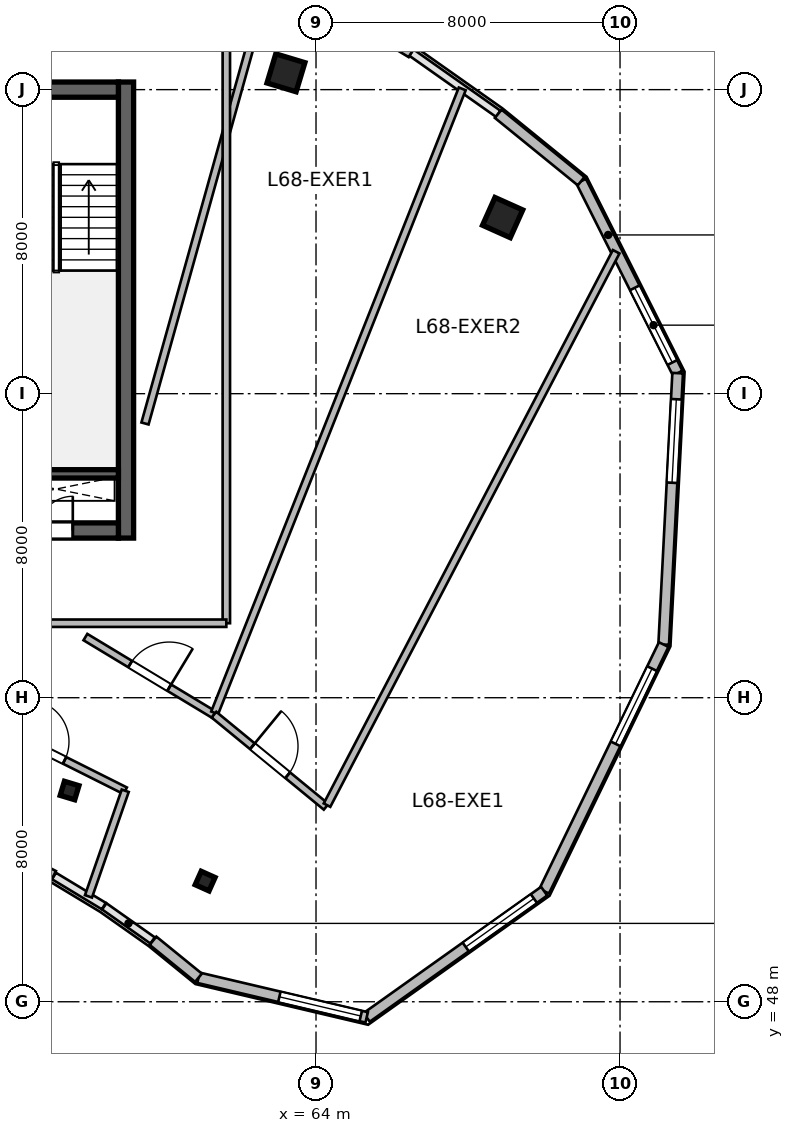
"""IFC4 building model, lengths in metres.
Left out: names, types, materials, properties, quantities, classifications, styles, units other than length and angle.
Written with IfcOpenShell. Run it as: python <this file> out.ifc"""

import sys

from ifc_helpers import new_model, si_unit, direction, frame, frame_2d, origin, origin_2d, place, context, subcontext, project, spatial, rectangle, i_section, extrude, source, transform, mapped, element, fill, save


model = new_model("IFC4")
c1 = context("Model", 3, precision=1e-05, world=origin(), true_north=direction((0.0, 1.0)))
c2 = subcontext(c1, "Body", "Model", "MODEL_VIEW")
j1 = project(units=[si_unit("LENGTHUNIT", "METRE"), si_unit("PLANEANGLEUNIT", "RADIAN")], contexts=[c1])
p1 = place(None, origin())
s1 = spatial("IfcSite", under=j1, at=p1, CompositionType="ELEMENT")
p2 = place(p1, origin())
s2 = spatial("IfcBuilding", under=s1, at=p2, CompositionType="ELEMENT")
p3 = place(p2, frame((0.0, 0.0, 279.6)))
s3 = spatial("IfcBuildingStorey", under=s2, at=p3, CompositionType="ELEMENT", Elevation=279.6)
m1 = source(origin(), c2, "Body", "SweptSolid", [
    extrude(rectangle(XDim=12.0, YDim=0.4, at=frame_2d((6.0, 0.0))), origin(), (0.0, 0.0, 1.0), 3.9),
])
p4 = place(p3, frame((59.0, 60.2, 0.0), z_axis=(0.0, 0.0, 1.0), x_axis=(0.0, 1.0, 0.0)))
e1 = element("IfcWall", 1, at=p4, inside=s3, PredefinedType="SHEAR", context=c2, shape_type="MappedRepresentation", body=[
    mapped(m1, transform((0.0, 0.0, 0.0), scale=1.0)),
])
m2 = source(origin(), c2, "Body", "SweptSolid", [
    extrude(rectangle(XDim=21.6, YDim=0.4, at=frame_2d((10.8, 0.0))), origin(), (0.0, 0.0, 1.0), 3.9),
])
p5 = place(p3, frame((37.2, 60.4, 0.0), z_axis=(0.0, 0.0, 1.0), x_axis=(1.0, 0.0, 0.0)))
e2 = element("IfcWall", 2, at=p5, inside=s3, PredefinedType="SHEAR", context=c2, shape_type="MappedRepresentation", body=[
    mapped(m2, transform((0.0, 0.0, 0.0), scale=1.0)),
])
p6 = place(p5, frame((1.1, 0.0, 0.0)))
e3 = element("IfcOpeningElement", 3, at=p6, cuts=e2, PredefinedType="OPENING", context=c2, shape_type="SweptSolid", body=[
    extrude(rectangle(XDim=1.15, YDim=2.15, at=frame_2d((0.575, 1.075))), frame((0.0, 0.21, 0.0), z_axis=(0.0, -1.0, 0.0), x_axis=(1.0, 0.0, 0.0)), (0.0, 0.0, 1.0), 0.42),
])
p7 = place(p5, frame((19.5, 0.0, 0.0)))
e4 = element("IfcOpeningElement", 4, at=p7, cuts=e2, PredefinedType="OPENING", context=c2, shape_type="SweptSolid", body=[
    extrude(rectangle(XDim=0.9, YDim=2.1, at=frame_2d((0.45, 1.05))), frame((0.0, 0.21, 0.0), z_axis=(0.0, -1.0, 0.0), x_axis=(1.0, 0.0, 0.0)), (0.0, 0.0, 1.0), 0.42),
])
p8 = place(p5, frame((12.02, 0.0, 0.0)))
e5 = element("IfcOpeningElement", 5, at=p8, cuts=e2, PredefinedType="OPENING", context=c2, shape_type="SweptSolid", body=[
    extrude(rectangle(XDim=1.6, YDim=2.15, at=frame_2d((0.8, 1.075))), frame((0.0, 0.21, 0.0), z_axis=(0.0, -1.0, 0.0), x_axis=(1.0, 0.0, 0.0)), (0.0, 0.0, 1.0), 0.42),
])
p9 = place(p3, frame((37.2, 72.0, 0.0), z_axis=(0.0, 0.0, 1.0), x_axis=(1.0, 0.0, 0.0)))
e6 = element("IfcWall", 6, at=p9, inside=s3, PredefinedType="SHEAR", context=c2, shape_type="MappedRepresentation", body=[
    mapped(m2, transform((0.0, 0.0, 0.0), scale=1.0)),
])
p10 = place(p9, frame((1.2, 0.0, 0.0)))
e7 = element("IfcOpeningElement", 7, at=p10, cuts=e6, PredefinedType="OPENING", context=c2, shape_type="SweptSolid", body=[
    extrude(rectangle(XDim=0.9, YDim=2.1, at=frame_2d((0.45, 1.05))), frame((0.0, 0.21, 0.0), z_axis=(0.0, -1.0, 0.0), x_axis=(1.0, 0.0, 0.0)), (0.0, 0.0, 1.0), 0.42),
])
p11 = place(p9, frame((14.7, 0.0, 0.0)))
e8 = element("IfcOpeningElement", 8, at=p11, cuts=e6, PredefinedType="OPENING", context=c2, shape_type="SweptSolid", body=[
    extrude(rectangle(XDim=1.2, YDim=2.15, at=frame_2d((0.6, 1.075))), frame((0.0, 0.21, 0.0), z_axis=(0.0, -1.0, 0.0), x_axis=(1.0, 0.0, 0.0)), (0.0, 0.0, 1.0), 0.42),
])
p12 = place(p9, frame((4.15, 0.0, 0.0)))
e9 = element("IfcOpeningElement", 9, at=p12, cuts=e6, PredefinedType="OPENING", context=c2, shape_type="SweptSolid", body=[
    extrude(rectangle(XDim=1.3, YDim=2.15, at=frame_2d((0.65, 1.075))), frame((0.0, 0.21, 0.0), z_axis=(0.0, -1.0, 0.0), x_axis=(1.0, 0.0, 0.0)), (0.0, 0.0, 1.0), 0.42),
])
p13 = place(p9, frame((7.25, 0.0, 0.0)))
e10 = element("IfcOpeningElement", 10, at=p13, cuts=e6, PredefinedType="OPENING", context=c2, shape_type="SweptSolid", body=[
    extrude(rectangle(XDim=0.9, YDim=2.1, at=frame_2d((0.45, 1.05))), frame((0.0, 0.21, 0.0), z_axis=(0.0, -1.0, 0.0), x_axis=(1.0, 0.0, 0.0)), (0.0, 0.0, 1.0), 0.42),
])
m3 = source(origin(), c2, "Body", "SweptSolid", [
    extrude(rectangle(XDim=3.27, YDim=0.22, at=frame_2d((1.635, 0.0))), origin(), (0.0, 0.0, 1.0), 3.9),
])
p14 = place(p3, frame((55.53, 61.89, 0.0), z_axis=(0.0, 0.0, 1.0), x_axis=(1.0, 0.0, 0.0)))
e11 = element("IfcWall", 11, at=p14, inside=s3, PredefinedType="SHEAR", context=c2, shape_type="MappedRepresentation", body=[
    mapped(m3, transform((0.0, 0.0, 0.0), scale=1.0)),
])
m4 = source(origin(), c2, "Body", "SweptSolid", [
    extrude(i_section(OverallWidth=0.399, OverallDepth=0.387, WebThickness=0.021, FlangeThickness=0.033, at=origin_2d()), origin(), (0.0, 0.0, 1.0), 3.9),
])
p15 = place(p3, frame((57.515, 53.558, 0.0), z_axis=(0.0, 0.0, 1.0), x_axis=(0.288697611798, 0.957420330337, 0.0)))
e12 = element("IfcColumn", 12, at=p15, inside=s3, PredefinedType="COLUMN", context=c2, shape_type="MappedRepresentation", body=[
    mapped(m4, transform((0.0, 0.0, 0.0), scale=1.0)),
])
m5 = source(origin(), c2, "Body", "SweptSolid", [
    extrude(rectangle(XDim=0.8, YDim=0.8, at=origin_2d()), origin(), (0.0, 0.0, 1.0), 3.9),
])
p16 = place(p3, frame((63.209, 72.442, 0.0), z_axis=(0.0, 0.0, 1.0), x_axis=(0.288697611798, 0.957420330337, 0.0)))
e13 = element("IfcColumn", 13, at=p16, inside=s3, PredefinedType="COLUMN", context=c2, shape_type="MappedRepresentation", body=[
    mapped(m5, transform((0.0, 0.0, 0.0), scale=1.0)),
])
p17 = place(p3, frame((61.082, 51.175, 0.0), z_axis=(0.0, 0.0, 1.0), x_axis=(0.409126902895, 0.912477494148, 0.0)))
e14 = element("IfcColumn", 14, at=p17, inside=s3, PredefinedType="COLUMN", context=c2, shape_type="MappedRepresentation", body=[
    mapped(m4, transform((0.0, 0.0, 0.0), scale=1.0)),
])
p18 = place(p3, frame((68.91, 68.633, 0.0), z_axis=(0.0, 0.0, 1.0), x_axis=(0.409126902895, 0.912477494148, 0.0)))
e15 = element("IfcColumn", 15, at=p18, inside=s3, PredefinedType="COLUMN", context=c2, shape_type="MappedRepresentation", body=[
    mapped(m5, transform((0.0, 0.0, 0.0), scale=1.0)),
])
m6 = source(origin(), c2, "Body", "SweptSolid", [
    extrude(rectangle(XDim=5.653, YDim=0.28, at=frame_2d((2.827, 0.0))), origin(), (0.0, 0.0, 1.0), 3.64),
])
p19 = place(p3, frame((70.976, 69.591, 0.0), z_axis=(0.0, 0.0, 1.0), x_axis=(0.449302555419, -0.893379658205, 0.0)))
e16 = element("IfcWall", 16, at=p19, inside=s3, PredefinedType="SOLIDWALL", context=c2, shape_type="MappedRepresentation", body=[
    mapped(m6, transform((0.0, 0.0, 0.0), scale=1.0)),
])
p20 = place(p19, frame((3.14, 0.0, 0.95)))
e17 = element("IfcOpeningElement", 17, at=p20, cuts=e16, PredefinedType="OPENING", context=c2, shape_type="SweptSolid", body=[
    extrude(rectangle(XDim=2.2, YDim=2.1, at=frame_2d((1.1, 1.05))), frame((0.0, 0.15, 0.0), z_axis=(0.0, -1.0, 0.0), x_axis=(1.0, 0.0, 0.0)), (0.0, 0.0, 1.0), 0.3),
])
m7 = source(origin(), c2, "Body", "SweptSolid", [
    extrude(rectangle(XDim=7.151, YDim=0.28, at=frame_2d((3.576, 0.0))), origin(), (0.0, 0.0, 1.0), 3.64),
])
p21 = place(p3, frame((73.516, 64.54, 0.0), z_axis=(0.0, 0.0, 1.0), x_axis=(-0.051449614265, -0.998675591567, 0.0)))
e18 = element("IfcWall", 18, at=p21, inside=s3, PredefinedType="SOLIDWALL", context=c2, shape_type="MappedRepresentation", body=[
    mapped(m7, transform((0.0, 0.0, 0.0), scale=1.0)),
])
p22 = place(p21, frame((0.688, 0.0, 0.95)))
e19 = element("IfcOpeningElement", 19, at=p22, cuts=e18, PredefinedType="OPENING", context=c2, shape_type="SweptSolid", body=[
    extrude(rectangle(XDim=2.2, YDim=2.1, at=frame_2d((1.1, 1.05))), frame((0.0, 0.15, 0.0), z_axis=(0.0, -1.0, 0.0), x_axis=(1.0, 0.0, 0.0)), (0.0, 0.0, 1.0), 0.3),
])
m8 = source(origin(), c2, "Body", "SweptSolid", [
    extrude(rectangle(XDim=7.211, YDim=0.28, at=frame_2d((3.606, 0.0))), origin(), (0.0, 0.0, 1.0), 3.64),
])
p23 = place(p3, frame((73.148, 57.399, 0.0), z_axis=(0.0, 0.0, 1.0), x_axis=(-0.436088263006, -0.899903898685, 0.0)))
e20 = element("IfcWall", 20, at=p23, inside=s3, PredefinedType="SOLIDWALL", context=c2, shape_type="MappedRepresentation", body=[
    mapped(m8, transform((0.0, 0.0, 0.0), scale=1.0)),
])
p24 = place(p23, frame((0.703, 0.0, 0.95)))
e21 = element("IfcOpeningElement", 21, at=p24, cuts=e20, PredefinedType="OPENING", context=c2, shape_type="SweptSolid", body=[
    extrude(rectangle(XDim=2.2, YDim=2.1, at=frame_2d((1.1, 1.05))), frame((0.0, 0.15, 0.0), z_axis=(0.0, -1.0, 0.0), x_axis=(1.0, 0.0, 0.0)), (0.0, 0.0, 1.0), 0.3),
])
m9 = source(origin(), c2, "Body", "SweptSolid", [
    extrude(rectangle(XDim=5.731, YDim=0.28, at=frame_2d((2.865, 0.0))), origin(), (0.0, 0.0, 1.0), 3.64),
])
p25 = place(p3, frame((70.004, 50.909, 0.0), z_axis=(0.0, 0.0, 1.0), x_axis=(-0.815021045908, -0.579431354629, 0.0)))
e22 = element("IfcWall", 22, at=p25, inside=s3, PredefinedType="SOLIDWALL", context=c2, shape_type="MappedRepresentation", body=[
    mapped(m9, transform((0.0, 0.0, 0.0), scale=1.0)),
])
p26 = place(p25, frame((0.333, 0.0, 0.95)))
e23 = element("IfcOpeningElement", 23, at=p26, cuts=e22, PredefinedType="OPENING", context=c2, shape_type="SweptSolid", body=[
    extrude(rectangle(XDim=2.2, YDim=2.1, at=frame_2d((1.1, 1.05))), frame((0.0, 0.15, 0.0), z_axis=(0.0, -1.0, 0.0), x_axis=(1.0, 0.0, 0.0)), (0.0, 0.0, 1.0), 0.3),
])
m10 = source(origin(), c2, "Body", "SweptSolid", [
    extrude(rectangle(XDim=4.547, YDim=0.28, at=frame_2d((2.273, 0.0))), origin(), (0.0, 0.0, 1.0), 3.64),
])
p27 = place(p3, frame((65.333, 47.589, 0.0), z_axis=(0.0, 0.0, 1.0), x_axis=(-0.973332593516, 0.229398479505, 0.0)))
e24 = element("IfcWall", 24, at=p27, inside=s3, PredefinedType="SOLIDWALL", context=c2, shape_type="MappedRepresentation", body=[
    mapped(m10, transform((0.0, 0.0, 0.0), scale=1.0)),
])
p28 = place(p27, frame((0.16, 0.0, 0.95)))
e25 = element("IfcOpeningElement", 25, at=p28, cuts=e24, PredefinedType="OPENING", context=c2, shape_type="SweptSolid", body=[
    extrude(rectangle(XDim=2.2, YDim=2.1, at=frame_2d((1.1, 1.05))), frame((0.0, 0.15, 0.0), z_axis=(0.0, -1.0, 0.0), x_axis=(1.0, 0.0, 0.0)), (0.0, 0.0, 1.0), 0.3),
])
m11 = source(origin(), c2, "Body", "SweptSolid", [
    extrude(rectangle(XDim=1.543, YDim=0.28, at=frame_2d((0.772, 0.0))), origin(), (0.0, 0.0, 1.0), 3.64),
])
p29 = place(p3, frame((60.908, 48.632, 0.0), z_axis=(0.0, 0.0, 1.0), x_axis=(-0.77582846857, 0.63094388606, 0.0)))
e26 = element("IfcWall", 26, at=p29, inside=s3, PredefinedType="SOLIDWALL", context=c2, shape_type="MappedRepresentation", body=[
    mapped(m11, transform((0.0, 0.0, 0.0), scale=1.0)),
])
m12 = source(origin(), c2, "Body", "SweptSolid", [
    extrude(rectangle(XDim=1.509, YDim=0.28, at=frame_2d((0.754, 0.0))), origin(), (0.0, 0.0, 1.0), 3.64),
])
p30 = place(p3, frame((57.094, 51.315, 0.0), z_axis=(0.0, 0.0, 1.0), x_axis=(-0.89169189228, 0.452642871635, 0.0)))
e27 = element("IfcWall", 27, at=p30, inside=s3, PredefinedType="SOLIDWALL", context=c2, shape_type="MappedRepresentation", body=[
    mapped(m12, transform((0.0, 0.0, 0.0), scale=1.0)),
])
m13 = source(origin(), c2, "Body", "SweptSolid", [
    extrude(rectangle(XDim=2.748, YDim=0.28, at=frame_2d((1.374, 0.0))), origin(), (0.0, 0.0, 1.0), 3.64),
])
p31 = place(p3, frame((64.157, 74.396, 0.0), z_axis=(0.0, 0.0, 1.0), x_axis=(0.856149718453, -0.516727838996, 0.0)))
e28 = element("IfcWall", 28, at=p31, inside=s3, PredefinedType="SOLIDWALL", context=c2, shape_type="MappedRepresentation", body=[
    mapped(m13, transform((0.0, 0.0, 0.0), scale=1.0)),
])
m14 = source(origin(), c2, "Body", "SweptSolid", [
    extrude(rectangle(XDim=2.812, YDim=0.28, at=frame_2d((1.406, 0.0))), origin(), (0.0, 0.0, 1.0), 3.64),
])
p32 = place(p3, frame((68.795, 71.365, 0.0), z_axis=(0.0, 0.0, 1.0), x_axis=(0.775880230716, -0.630880232361, 0.0)))
e29 = element("IfcWall", 29, at=p32, inside=s3, PredefinedType="SOLIDWALL", context=c2, shape_type="MappedRepresentation", body=[
    mapped(m14, transform((0.0, 0.0, 0.0), scale=1.0)),
])
m15 = source(origin(), c2, "Body", "SweptSolid", [
    extrude(rectangle(XDim=4.271, YDim=0.195, at=frame_2d((2.135, 0.0))), origin(), (0.0, 0.0, 1.0), 3.64),
])
p33 = place(p3, frame((55.161, 55.465, 0.0), z_axis=(0.0, 0.0, 1.0), x_axis=(0.894061035522, -0.447945158207, 0.0)))
e30 = element("IfcWall", 30, at=p33, inside=s3, PredefinedType="PARTITIONING", context=c2, shape_type="MappedRepresentation", body=[
    mapped(m15, transform((0.0, 0.0, 0.0), scale=1.0)),
])
p34 = place(p33, frame((1.385, 0.0, 0.0)))
e31 = element("IfcOpeningElement", 31, at=p34, cuts=e30, PredefinedType="OPENING", context=c2, shape_type="SweptSolid", body=[
    extrude(rectangle(XDim=1.1, YDim=2.15, at=frame_2d((0.55, 1.075))), frame((0.0, 0.107, 0.0), z_axis=(0.0, -1.0, 0.0), x_axis=(1.0, 0.0, 0.0)), (0.0, 0.0, 1.0), 0.215),
])
m16 = source(origin(), c2, "Body", "SweptSolid", [
    extrude(rectangle(XDim=2.942, YDim=0.195, at=frame_2d((1.471, 0.0))), origin(), (0.0, 0.0, 1.0), 3.64),
])
p35 = place(p3, frame((58.013, 50.773, 0.0), z_axis=(0.0, 0.0, 1.0), x_axis=(0.328623620494, 0.944460965871, 0.0)))
e32 = element("IfcWall", 32, at=p35, inside=s3, PredefinedType="PARTITIONING", context=c2, shape_type="MappedRepresentation", body=[
    mapped(m16, transform((0.0, 0.0, 0.0), scale=1.0)),
])
m17 = source(origin(), c2, "Body", "SweptSolid", [
    extrude(rectangle(XDim=3.951, YDim=0.195, at=frame_2d((1.975, 0.0))), origin(), (0.0, 0.0, 1.0), 3.64),
])
p36 = place(p3, frame((57.932, 57.596, 0.0), z_axis=(0.0, 0.0, 1.0), x_axis=(0.856137696849, -0.51674775668, 0.0)))
e33 = element("IfcWall", 33, at=p36, inside=s3, PredefinedType="PARTITIONING", context=c2, shape_type="MappedRepresentation", body=[
    mapped(m17, transform((0.0, 0.0, 0.0), scale=1.0)),
])
p37 = place(p36, frame((1.375, 0.0, 0.0)))
e34 = element("IfcOpeningElement", 34, at=p37, cuts=e33, PredefinedType="OPENING", context=c2, shape_type="SweptSolid", body=[
    extrude(rectangle(XDim=1.2, YDim=2.15, at=frame_2d((0.6, 1.075))), frame((0.0, 0.107, 0.0), z_axis=(0.0, -1.0, 0.0), x_axis=(1.0, 0.0, 0.0)), (0.0, 0.0, 1.0), 0.215),
])
m18 = source(origin(), c2, "Body", "SweptSolid", [
    extrude(rectangle(XDim=12.307, YDim=0.195, at=frame_2d((6.153, 0.0))), origin(), (0.0, 0.0, 1.0), 3.64),
])
p38 = place(p3, frame((59.5, 63.216, 0.0), z_axis=(0.0, 0.0, 1.0), x_axis=(0.268768150257, 0.96320490105, 0.0)))
e35 = element("IfcWall", 35, at=p38, inside=s3, PredefinedType="PARTITIONING", context=c2, shape_type="MappedRepresentation", body=[
    mapped(m18, transform((0.0, 0.0, 0.0), scale=1.0)),
])
m19 = source(origin(), c2, "Body", "SweptSolid", [
    extrude(rectangle(XDim=17.664, YDim=0.195, at=frame_2d((8.832, 0.0))), origin(), (0.0, 0.0, 1.0), 3.64),
])
p39 = place(p3, frame((61.333, 55.602, 0.0), z_axis=(0.0, 0.0, 1.0), x_axis=(0.368827513738, 0.929497856431, 0.0)))
e36 = element("IfcWall", 36, at=p39, inside=s3, PredefinedType="PARTITIONING", context=c2, shape_type="MappedRepresentation", body=[
    mapped(m19, transform((0.0, 0.0, 0.0), scale=1.0)),
])
m20 = source(origin(), c2, "Body", "SweptSolid", [
    extrude(rectangle(XDim=3.82, YDim=0.195, at=frame_2d((1.91, 0.0))), origin(), (0.0, 0.0, 1.0), 3.64),
])
p40 = place(p3, frame((61.314, 55.554, 0.0), z_axis=(0.0, 0.0, 1.0), x_axis=(0.772805728445, -0.63464266015, 0.0)))
e37 = element("IfcWall", 37, at=p40, inside=s3, PredefinedType="PARTITIONING", context=c2, shape_type="MappedRepresentation", body=[
    mapped(m20, transform((0.0, 0.0, 0.0), scale=1.0)),
])
p41 = place(p40, frame((1.31, 0.0, 0.0)))
e38 = element("IfcOpeningElement", 38, at=p41, cuts=e37, PredefinedType="OPENING", context=c2, shape_type="SweptSolid", body=[
    extrude(rectangle(XDim=1.2, YDim=2.15, at=frame_2d((0.6, 1.075))), frame((0.0, 0.107, 0.0), z_axis=(0.0, -1.0, 0.0), x_axis=(1.0, 0.0, 0.0)), (0.0, 0.0, 1.0), 0.215),
])
m21 = source(origin(), c2, "Body", "SweptSolid", [
    extrude(rectangle(XDim=16.43, YDim=0.195, at=frame_2d((8.215, 0.0))), origin(), (0.0, 0.0, 1.0), 3.64),
])
p42 = place(p3, frame((64.29, 53.174, 0.0), z_axis=(0.0, 0.0, 1.0), x_axis=(0.463119459371, 0.886295868405, 0.0)))
e39 = element("IfcWall", 39, at=p42, inside=s3, PredefinedType="PARTITIONING", context=c2, shape_type="MappedRepresentation", body=[
    mapped(m21, transform((0.0, 0.0, 0.0), scale=1.0)),
])
m22 = source(origin(), c2, "Body", "SweptSolid", [
    extrude(rectangle(XDim=17.693, YDim=0.195, at=frame_2d((8.847, 0.0))), origin(), (0.0, 0.0, 1.0), 3.64),
])
p43 = place(p3, frame((61.64, 57.96, 0.0), z_axis=(0.0, 0.0, 1.0), x_axis=(0.0, 1.0, 0.0)))
e40 = element("IfcWall", 40, at=p43, inside=s3, PredefinedType="PARTITIONING", context=c2, shape_type="MappedRepresentation", body=[
    mapped(m22, transform((0.0, 0.0, 0.0), scale=1.0)),
])
m23 = source(origin(), c2, "Body", "SweptSolid", [
    extrude(rectangle(XDim=12.39, YDim=0.195, at=frame_2d((6.195, 0.0))), origin(), (0.0, 0.0, 1.0), 3.64),
])
p44 = place(p3, frame((49.25, 57.96, 0.0), z_axis=(0.0, 0.0, 1.0), x_axis=(1.0, 0.0, 0.0)))
e41 = element("IfcWall", 41, at=p44, inside=s3, PredefinedType="PARTITIONING", context=c2, shape_type="MappedRepresentation", body=[
    mapped(m23, transform((0.0, 0.0, 0.0), scale=1.0)),
])
m24 = source(origin(), c2, "Body", "SweptSolid", [
    extrude(rectangle(XDim=2.2, YDim=2.1, at=frame_2d((1.1, 1.05))), frame((0.0, 0.03, 0.0), z_axis=(0.0, -1.0, 0.0), x_axis=(1.0, 0.0, 0.0)), (0.0, 0.0, 1.0), 0.06),
])
p45 = place(p20, origin())
e42 = element("IfcWindow", 42, at=p45, inside=s3, PartitioningType="TRIPLE_PANEL_VERTICAL", PredefinedType="WINDOW", context=c2, shape_type="MappedRepresentation", body=[
    mapped(m24, transform((0.0, 0.0, 0.0), scale=1.0)),
])
fill(e17, e42)
p46 = place(p22, origin())
e43 = element("IfcWindow", 43, at=p46, inside=s3, PartitioningType="TRIPLE_PANEL_VERTICAL", PredefinedType="WINDOW", context=c2, shape_type="MappedRepresentation", body=[
    mapped(m24, transform((0.0, 0.0, 0.0), scale=1.0)),
])
fill(e19, e43)
p47 = place(p24, origin())
e44 = element("IfcWindow", 44, at=p47, inside=s3, PartitioningType="TRIPLE_PANEL_VERTICAL", PredefinedType="WINDOW", context=c2, shape_type="MappedRepresentation", body=[
    mapped(m24, transform((0.0, 0.0, 0.0), scale=1.0)),
])
fill(e21, e44)
p48 = place(p26, origin())
e45 = element("IfcWindow", 45, at=p48, inside=s3, PartitioningType="TRIPLE_PANEL_VERTICAL", PredefinedType="WINDOW", context=c2, shape_type="MappedRepresentation", body=[
    mapped(m24, transform((0.0, 0.0, 0.0), scale=1.0)),
])
fill(e23, e45)
p49 = place(p28, origin())
e46 = element("IfcWindow", 46, at=p49, inside=s3, PartitioningType="TRIPLE_PANEL_VERTICAL", PredefinedType="WINDOW", context=c2, shape_type="MappedRepresentation", body=[
    mapped(m24, transform((0.0, 0.0, 0.0), scale=1.0)),
])
fill(e25, e46)
m25 = source(origin(), c2, "Body", "SweptSolid", [
    extrude(rectangle(XDim=0.9, YDim=2.1, at=frame_2d((0.45, 1.05))), frame((0.0, 0.025, 0.0), z_axis=(0.0, -1.0, 0.0), x_axis=(1.0, 0.0, 0.0)), (0.0, 0.0, 1.0), 0.05),
])
p50 = place(p7, origin())
e47 = element("IfcDoor", 47, at=p50, inside=s3, OperationType="SINGLE_SWING_RIGHT", PredefinedType="DOOR", context=c2, shape_type="MappedRepresentation", body=[
    mapped(m25, transform((0.0, 0.0, 0.0), scale=1.0)),
])
fill(e4, e47)
m26 = source(origin(), c2, "Body", "SweptSolid", [
    extrude(rectangle(XDim=1.1, YDim=2.15, at=frame_2d((0.55, 1.075))), frame((0.0, 0.025, 0.0), z_axis=(0.0, -1.0, 0.0), x_axis=(1.0, 0.0, 0.0)), (0.0, 0.0, 1.0), 0.05),
])
p51 = place(p34, origin())
e48 = element("IfcDoor", 48, at=p51, inside=s3, OperationType="SINGLE_SWING_LEFT", PredefinedType="DOOR", context=c2, shape_type="MappedRepresentation", body=[
    mapped(m26, transform((0.0, 0.0, 0.0), scale=1.0)),
])
fill(e31, e48)
m27 = source(origin(), c2, "Body", "SweptSolid", [
    extrude(rectangle(XDim=1.2, YDim=2.15, at=frame_2d((0.6, 1.075))), frame((0.0, 0.025, 0.0), z_axis=(0.0, -1.0, 0.0), x_axis=(1.0, 0.0, 0.0)), (0.0, 0.0, 1.0), 0.05),
])
p52 = place(p37, origin())
e49 = element("IfcDoor", 49, at=p52, inside=s3, OperationType="SINGLE_SWING_RIGHT", PredefinedType="DOOR", context=c2, shape_type="MappedRepresentation", body=[
    mapped(m27, transform((0.0, 0.0, 0.0), scale=1.0)),
])
fill(e34, e49)
p53 = place(p41, origin())
e50 = element("IfcDoor", 50, at=p53, inside=s3, OperationType="SINGLE_SWING_LEFT", PredefinedType="DOOR", context=c2, shape_type="MappedRepresentation", body=[
    mapped(m27, transform((0.0, 0.0, 0.0), scale=1.0)),
])
fill(e38, e50)
save(model, sys.argv[1])
